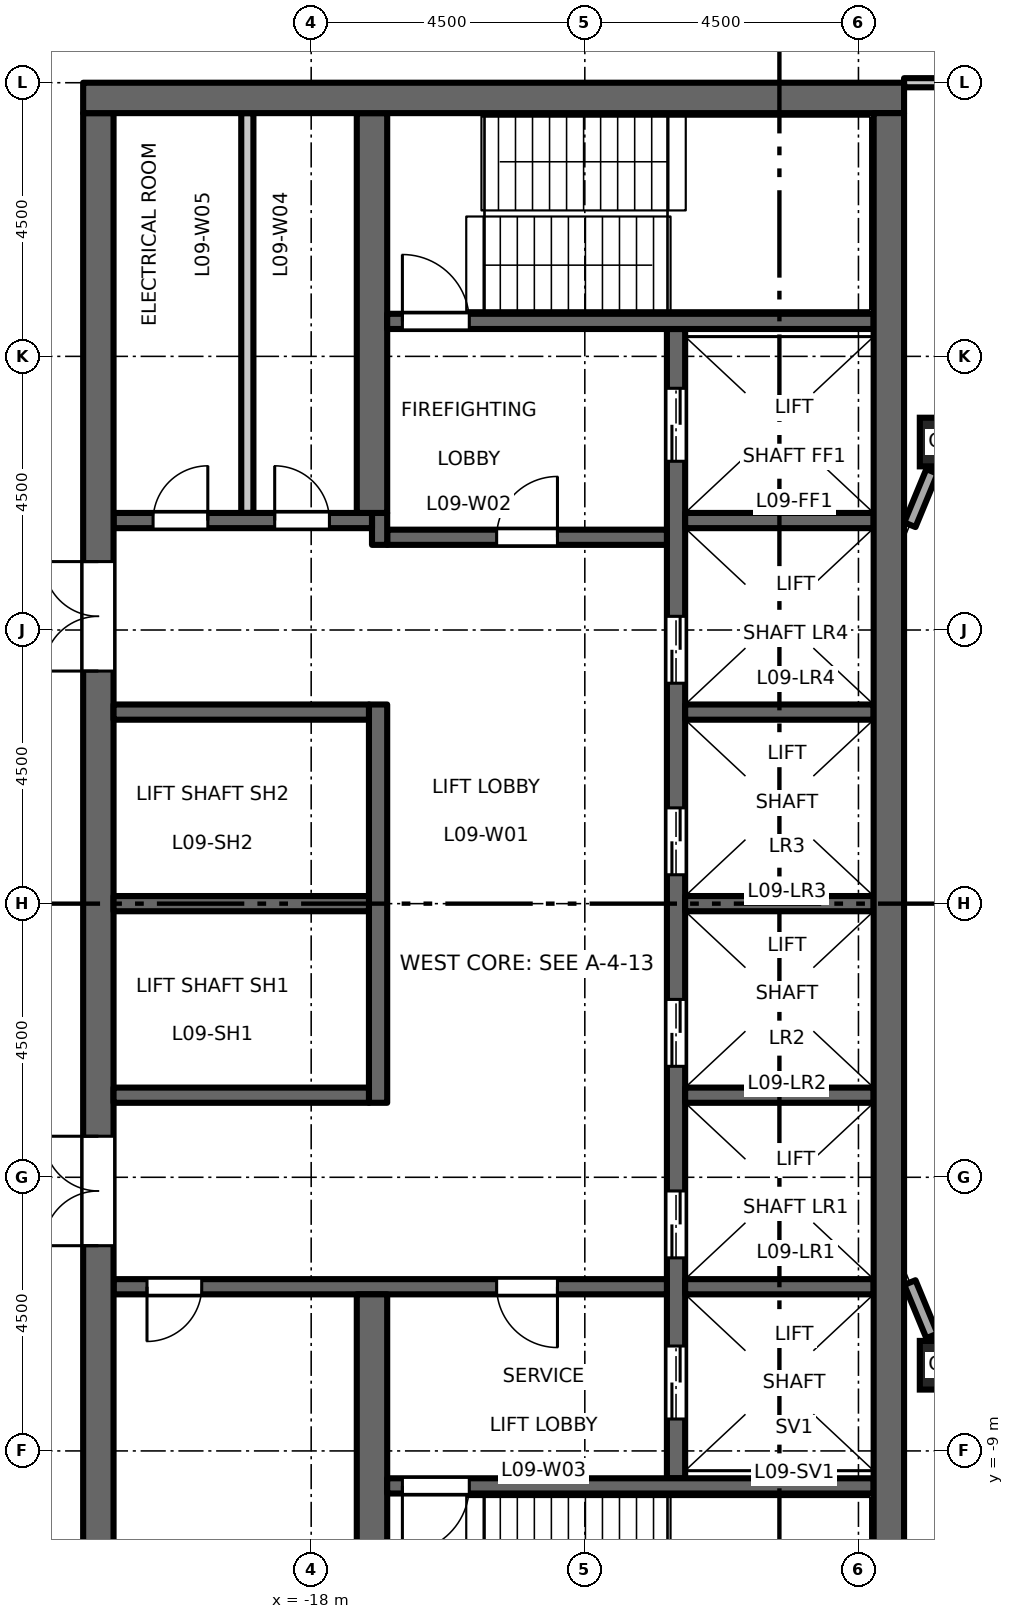
"""IFC4 building model, lengths in metres.
Left out: names, types, materials, properties, quantities, classifications, styles, units other than length and angle.
Written with IfcOpenShell. Run it as: python <this file> out.ifc"""

import sys

from ifc_helpers import new_model, si_unit, direction, frame, frame_2d, origin, origin_2d, place, context, subcontext, project, spatial, rectangle, hollow_rectangle, extrude, element, fill, save


model = new_model("IFC4")
c1 = context("Model", 3, precision=1e-05, world=origin(), true_north=direction((0.0, 1.0)))
c2 = subcontext(c1, "Body", "Model", "MODEL_VIEW")
j1 = project(units=[si_unit("LENGTHUNIT", "METRE"), si_unit("PLANEANGLEUNIT", "RADIAN")], contexts=[c1])
p1 = place(None, origin())
s1 = spatial("IfcSite", under=j1, at=p1, CompositionType="ELEMENT")
p2 = place(p1, origin())
s2 = spatial("IfcBuilding", under=s1, at=p2, CompositionType="ELEMENT")
p3 = place(p2, frame((0.0, 0.0, 44.7)))
s3 = spatial("IfcBuildingStorey", under=s2, at=p3, CompositionType="ELEMENT", Elevation=44.7)
for number, where, z_axis, x_axis in (
    (1, (-7.591, -7.591, 0.0), (0.0, 0.0, 1.0), (1.0, 0.0, 0.0)),
    (2, (-7.591, 7.591, 0.0), (0.0, 0.0, 1.0), (1.0, 0.0, 0.0)),
):
    element("IfcColumn", number, at=place(p3, frame(where, z_axis=z_axis, x_axis=x_axis)), inside=s3, PredefinedType="COLUMN", context=c2, shape_type="SweptSolid", body=[
        extrude(hollow_rectangle(XDim=0.8, YDim=0.8, WallThickness=0.05, at=origin_2d()), origin(), (0.0, 0.0, 1.0), 4.5),
    ])
p4 = place(p3, frame((-12.0, -9.45, 0.0), z_axis=(0.0, 0.0, 1.0), x_axis=(0.0, 1.0, 0.0)))
e3 = element("IfcWall", 3, at=p4, inside=s3, PredefinedType="SHEAR", context=c2, shape_type="SweptSolid", body=[
    extrude(rectangle(XDim=18.9, YDim=0.3, at=frame_2d((9.45, 0.0))), origin(), (0.0, 0.0, 1.0), 4.35),
])
p5 = place(p4, frame((3.625, 0.0, 0.0)))
e4 = element("IfcOpeningElement", 4, at=p5, cuts=e3, PredefinedType="OPENING", context=c2, shape_type="SweptSolid", body=[
    extrude(rectangle(XDim=1.1, YDim=2.1, at=frame_2d((0.55, 1.05))), frame((0.0, 0.16, 0.0), z_axis=(0.0, -1.0, 0.0), x_axis=(1.0, 0.0, 0.0)), (0.0, 0.0, 1.0), 0.32),
])
p6 = place(p4, frame((6.775, 0.0, 0.0)))
e5 = element("IfcOpeningElement", 5, at=p6, cuts=e3, PredefinedType="OPENING", context=c2, shape_type="SweptSolid", body=[
    extrude(rectangle(XDim=1.1, YDim=2.1, at=frame_2d((0.55, 1.05))), frame((0.0, 0.16, 0.0), z_axis=(0.0, -1.0, 0.0), x_axis=(1.0, 0.0, 0.0)), (0.0, 0.0, 1.0), 0.32),
])
p7 = place(p4, frame((9.925, 0.0, 0.0)))
e6 = element("IfcOpeningElement", 6, at=p7, cuts=e3, PredefinedType="OPENING", context=c2, shape_type="SweptSolid", body=[
    extrude(rectangle(XDim=1.1, YDim=2.1, at=frame_2d((0.55, 1.05))), frame((0.0, 0.16, 0.0), z_axis=(0.0, -1.0, 0.0), x_axis=(1.0, 0.0, 0.0)), (0.0, 0.0, 1.0), 0.32),
])
p8 = place(p4, frame((13.075, 0.0, 0.0)))
e7 = element("IfcOpeningElement", 7, at=p8, cuts=e3, PredefinedType="OPENING", context=c2, shape_type="SweptSolid", body=[
    extrude(rectangle(XDim=1.1, YDim=2.1, at=frame_2d((0.55, 1.05))), frame((0.0, 0.16, 0.0), z_axis=(0.0, -1.0, 0.0), x_axis=(1.0, 0.0, 0.0)), (0.0, 0.0, 1.0), 0.32),
])
p9 = place(p4, frame((16.725, 0.0, 0.0)))
e8 = element("IfcOpeningElement", 8, at=p9, cuts=e3, PredefinedType="OPENING", context=c2, shape_type="SweptSolid", body=[
    extrude(rectangle(XDim=1.2, YDim=2.1, at=frame_2d((0.6, 1.05))), frame((0.0, 0.16, 0.0), z_axis=(0.0, -1.0, 0.0), x_axis=(1.0, 0.0, 0.0)), (0.0, 0.0, 1.0), 0.32),
])
p10 = place(p4, frame((0.975, 0.0, 0.0)))
e9 = element("IfcOpeningElement", 9, at=p10, cuts=e3, PredefinedType="OPENING", context=c2, shape_type="SweptSolid", body=[
    extrude(rectangle(XDim=1.2, YDim=2.1, at=frame_2d((0.6, 1.05))), frame((0.0, 0.16, 0.0), z_axis=(0.0, -1.0, 0.0), x_axis=(1.0, 0.0, 0.0)), (0.0, 0.0, 1.0), 0.32),
])
p11 = place(p3, frame((-12.15, 6.025, 0.0), z_axis=(0.0, 0.0, 1.0), x_axis=(-1.0, 0.0, 0.0)))
e10 = element("IfcWall", 10, at=p11, inside=s3, PredefinedType="SHEAR", context=c2, shape_type="SweptSolid", body=[
    extrude(rectangle(XDim=4.6, YDim=0.25, at=frame_2d((2.3, 0.0))), origin(), (0.0, 0.0, 1.0), 4.35),
])
p12 = place(p11, frame((1.8, 0.0, 0.0)))
e11 = element("IfcOpeningElement", 11, at=p12, cuts=e10, PredefinedType="OPENING", context=c2, shape_type="SweptSolid", body=[
    extrude(rectangle(XDim=1.0, YDim=2.1, at=frame_2d((0.5, 1.05))), frame((0.0, 0.135, 0.0), z_axis=(0.0, -1.0, 0.0), x_axis=(1.0, 0.0, 0.0)), (0.0, 0.0, 1.0), 0.27),
])
p13 = place(p3, frame((-16.875, 5.9, 0.0), z_axis=(0.0, 0.0, 1.0), x_axis=(0.0, 1.0, 0.0)))
e12 = element("IfcWall", 12, at=p13, inside=s3, PredefinedType="SHEAR", context=c2, shape_type="SweptSolid", body=[
    extrude(rectangle(XDim=0.525, YDim=0.25, at=frame_2d((0.263, 0.0))), origin(), (0.0, 0.0, 1.0), 4.35),
])
p14 = place(p3, frame((-17.0, 6.3, 0.0), z_axis=(0.0, 0.0, 1.0), x_axis=(-1.0, 0.0, 0.0)))
e13 = element("IfcWall", 13, at=p14, inside=s3, PredefinedType="SHEAR", context=c2, shape_type="SweptSolid", body=[
    extrude(rectangle(XDim=4.25, YDim=0.25, at=frame_2d((2.125, 0.0))), origin(), (0.0, 0.0, 1.0), 4.35),
])
p15 = place(p14, frame((0.7, 0.0, 0.0)))
e14 = element("IfcOpeningElement", 14, at=p15, cuts=e13, PredefinedType="OPENING", context=c2, shape_type="SweptSolid", body=[
    extrude(rectangle(XDim=0.9, YDim=2.1, at=frame_2d((0.45, 1.05))), frame((0.0, 0.135, 0.0), z_axis=(0.0, -1.0, 0.0), x_axis=(1.0, 0.0, 0.0)), (0.0, 0.0, 1.0), 0.27),
])
p16 = place(p14, frame((2.7, 0.0, 0.0)))
e15 = element("IfcOpeningElement", 15, at=p16, cuts=e13, PredefinedType="OPENING", context=c2, shape_type="SweptSolid", body=[
    extrude(rectangle(XDim=0.9, YDim=2.1, at=frame_2d((0.45, 1.05))), frame((0.0, 0.135, 0.0), z_axis=(0.0, -1.0, 0.0), x_axis=(1.0, 0.0, 0.0)), (0.0, 0.0, 1.0), 0.27),
])
p17 = place(p3, frame((-12.15, -6.3, 0.0), z_axis=(0.0, 0.0, 1.0), x_axis=(-1.0, 0.0, 0.0)))
e16 = element("IfcWall", 16, at=p17, inside=s3, PredefinedType="SHEAR", context=c2, shape_type="SweptSolid", body=[
    extrude(rectangle(XDim=9.1, YDim=0.25, at=frame_2d((4.55, 0.0))), origin(), (0.0, 0.0, 1.0), 4.35),
])
p18 = place(p17, frame((1.8, 0.0, 0.0)))
e17 = element("IfcOpeningElement", 17, at=p18, cuts=e16, PredefinedType="OPENING", context=c2, shape_type="SweptSolid", body=[
    extrude(rectangle(XDim=1.0, YDim=2.1, at=frame_2d((0.5, 1.05))), frame((0.0, 0.135, 0.0), z_axis=(0.0, -1.0, 0.0), x_axis=(1.0, 0.0, 0.0)), (0.0, 0.0, 1.0), 0.27),
])
p19 = place(p17, frame((7.65, 0.0, 0.0)))
e18 = element("IfcOpeningElement", 18, at=p19, cuts=e16, PredefinedType="OPENING", context=c2, shape_type="SweptSolid", body=[
    extrude(rectangle(XDim=0.9, YDim=2.1, at=frame_2d((0.45, 1.05))), frame((0.0, 0.135, 0.0), z_axis=(0.0, -1.0, 0.0), x_axis=(1.0, 0.0, 0.0)), (0.0, 0.0, 1.0), 0.27),
])
p20 = place(p3, frame((-21.5, -13.0, 0.0), z_axis=(0.0, 0.0, 1.0), x_axis=(0.0, 1.0, 0.0)))
e19 = element("IfcWall", 19, at=p20, inside=s3, PredefinedType="SHEAR", context=c2, shape_type="SweptSolid", body=[
    extrude(rectangle(XDim=26.0, YDim=0.5, at=frame_2d((13.0, 0.0))), origin(), (0.0, 0.0, 1.0), 4.35),
])
p21 = place(p20, frame((16.825, 0.0, 0.0)))
e20 = element("IfcOpeningElement", 20, at=p21, cuts=e19, PredefinedType="OPENING", context=c2, shape_type="SweptSolid", body=[
    extrude(rectangle(XDim=1.8, YDim=2.1, at=frame_2d((0.9, 1.05))), frame((0.0, 0.26, 0.0), z_axis=(0.0, -1.0, 0.0), x_axis=(1.0, 0.0, 0.0)), (0.0, 0.0, 1.0), 0.52),
])
p22 = place(p20, frame((7.375, 0.0, 0.0)))
e21 = element("IfcOpeningElement", 21, at=p22, cuts=e19, PredefinedType="OPENING", context=c2, shape_type="SweptSolid", body=[
    extrude(rectangle(XDim=1.8, YDim=2.1, at=frame_2d((0.9, 1.05))), frame((0.0, 0.26, 0.0), z_axis=(0.0, -1.0, 0.0), x_axis=(1.0, 0.0, 0.0)), (0.0, 0.0, 1.0), 0.52),
])
p23 = place(p3, frame((-19.05, 6.425, 0.0), z_axis=(0.0, 0.0, 1.0), x_axis=(0.0, 1.0, 0.0)))
e22 = element("IfcWall", 22, at=p23, inside=s3, PredefinedType="PARTITIONING", context=c2, shape_type="SweptSolid", body=[
    extrude(rectangle(XDim=6.575, YDim=0.2, at=frame_2d((3.288, 0.0))), origin(), (0.0, 0.0, 1.0), 4.35),
])
p24 = place(p3, frame((-16.9, -3.275, 0.0), z_axis=(0.0, 0.0, 1.0), x_axis=(0.0, 1.0, 0.0)))
e23 = element("IfcWall", 23, at=p24, inside=s3, PredefinedType="SHEAR", context=c2, shape_type="SweptSolid", body=[
    extrude(rectangle(XDim=6.55, YDim=0.3, at=frame_2d((3.275, 0.0))), origin(), (0.0, 0.0, 1.0), 4.35),
])
for number, where, z_axis, x_axis in (
    (24, (-17.05, 0.0, 0.0), (0.0, 0.0, 1.0), (-1.0, 0.0, 0.0)),
    (25, (-17.05, 3.15, 0.0), (0.0, 0.0, 1.0), (-1.0, 0.0, 0.0)),
    (26, (-17.05, -3.15, 0.0), (0.0, 0.0, 1.0), (-1.0, 0.0, 0.0)),
):
    element("IfcWall", number, at=place(p3, frame(where, z_axis=z_axis, x_axis=x_axis)), inside=s3, PredefinedType="SHEAR", context=c2, shape_type="SweptSolid", body=[
        extrude(rectangle(XDim=4.2, YDim=0.25, at=frame_2d((2.1, 0.0))), origin(), (0.0, 0.0, 1.0), 4.35),
    ])
for number, where, z_axis, x_axis in (
    (27, (-17.0, 6.425, 0.0), (0.0, 0.0, 1.0), (0.0, 1.0, 0.0)),
    (28, (-17.0, -13.0, 0.0), (0.0, 0.0, 1.0), (0.0, 1.0, 0.0)),
):
    element("IfcWall", number, at=place(p3, frame(where, z_axis=z_axis, x_axis=x_axis)), inside=s3, PredefinedType="SHEAR", context=c2, shape_type="SweptSolid", body=[
        extrude(rectangle(XDim=6.575, YDim=0.5, at=frame_2d((3.288, 0.0))), origin(), (0.0, 0.0, 1.0), 4.35),
    ])
for number, where, z_axis, x_axis in (
    (29, (-8.75, 0.0, 0.0), (0.0, 0.0, 1.0), (-1.0, 0.0, 0.0)),
    (30, (-8.75, 3.15, 0.0), (0.0, 0.0, 1.0), (-1.0, 0.0, 0.0)),
    (31, (-8.75, 6.3, 0.0), (0.0, 0.0, 1.0), (-1.0, 0.0, 0.0)),
    (32, (-8.75, -3.15, 0.0), (0.0, 0.0, 1.0), (-1.0, 0.0, 0.0)),
    (33, (-8.75, -6.3, 0.0), (0.0, 0.0, 1.0), (-1.0, 0.0, 0.0)),
):
    element("IfcWall", number, at=place(p3, frame(where, z_axis=z_axis, x_axis=x_axis)), inside=s3, PredefinedType="SHEAR", context=c2, shape_type="SweptSolid", body=[
        extrude(rectangle(XDim=3.1, YDim=0.25, at=frame_2d((1.55, 0.0))), origin(), (0.0, 0.0, 1.0), 4.35),
    ])
p25 = place(p3, frame((-8.75, 9.575, 0.0), z_axis=(0.0, 0.0, 1.0), x_axis=(-1.0, 0.0, 0.0)))
e34 = element("IfcWall", 34, at=p25, inside=s3, PredefinedType="SHEAR", context=c2, shape_type="SweptSolid", body=[
    extrude(rectangle(XDim=8.0, YDim=0.25, at=frame_2d((4.0, 0.0))), origin(), (0.0, 0.0, 1.0), 4.35),
])
p26 = place(p25, frame((6.65, 0.0, 0.0)))
e35 = element("IfcOpeningElement", 35, at=p26, cuts=e34, PredefinedType="OPENING", context=c2, shape_type="SweptSolid", body=[
    extrude(rectangle(XDim=1.1, YDim=2.1, at=frame_2d((0.55, 1.05))), frame((0.0, 0.135, 0.0), z_axis=(0.0, -1.0, 0.0), x_axis=(1.0, 0.0, 0.0)), (0.0, 0.0, 1.0), 0.27),
])
p27 = place(p3, frame((-8.75, -9.575, 0.0), z_axis=(0.0, 0.0, 1.0), x_axis=(-1.0, 0.0, 0.0)))
e36 = element("IfcWall", 36, at=p27, inside=s3, PredefinedType="SHEAR", context=c2, shape_type="SweptSolid", body=[
    extrude(rectangle(XDim=8.0, YDim=0.25, at=frame_2d((4.0, 0.0))), origin(), (0.0, 0.0, 1.0), 4.35),
])
p28 = place(p27, frame((6.65, 0.0, 0.0)))
e37 = element("IfcOpeningElement", 37, at=p28, cuts=e36, PredefinedType="OPENING", context=c2, shape_type="SweptSolid", body=[
    extrude(rectangle(XDim=1.1, YDim=2.1, at=frame_2d((0.55, 1.05))), frame((0.0, 0.135, 0.0), z_axis=(0.0, -1.0, 0.0), x_axis=(1.0, 0.0, 0.0)), (0.0, 0.0, 1.0), 0.27),
])
p29 = place(p3, frame((-8.25, 13.25, 0.0), z_axis=(0.0, 0.0, 1.0), x_axis=(-1.0, 0.0, 0.0)))
e38 = element("IfcWall", 38, at=p29, inside=s3, PredefinedType="SHEAR", context=c2, shape_type="SweptSolid", body=[
    extrude(rectangle(XDim=13.5, YDim=0.5, at=frame_2d((6.75, 0.0))), origin(), (0.0, 0.0, 1.0), 4.35),
])
p30 = place(p3, frame((-8.5, -13.0, 0.0), z_axis=(0.0, 0.0, 1.0), x_axis=(0.0, 1.0, 0.0)))
e39 = element("IfcWall", 39, at=p30, inside=s3, PredefinedType="SHEAR", context=c2, shape_type="SweptSolid", body=[
    extrude(rectangle(XDim=26.0, YDim=0.5, at=frame_2d((13.0, 0.0))), origin(), (0.0, 0.0, 1.0), 4.35),
])
for number, where, z_axis, x_axis in (
    (40, (-7.791, 7.108, 0.0), (0.0, 0.0, 1.0), (-0.383, -0.924, 0.0)),
    (41, (-8.154, -6.231, 0.0), (0.0, 0.0, 1.0), (0.383, -0.924, 0.0)),
):
    element("IfcWall", number, at=place(p3, frame(where, z_axis=z_axis, x_axis=x_axis)), inside=s3, PredefinedType="STANDARD", context=c2, shape_type="SweptSolid", body=[
        extrude(rectangle(XDim=0.949, YDim=0.2, at=frame_2d((0.475, 0.0))), origin(), (0.0, 0.0, 1.0), 3.73),
    ])
p31 = place(p3, frame((-8.25, 13.5, 0.0), z_axis=(0.0, 0.0, 1.0), x_axis=(1.0, 0.0, 0.0)))
e42 = element("IfcWall", 42, at=p31, inside=s3, PredefinedType="PARTITIONING", context=c2, shape_type="SweptSolid", body=[
    extrude(rectangle(XDim=16.5, YDim=0.15, at=frame_2d((8.25, 0.0))), origin(), (0.0, 0.0, 1.0), 3.85),
])
p32 = place(p31, frame((7.65, 0.0, 0.0)))
e43 = element("IfcOpeningElement", 43, at=p32, cuts=e42, PredefinedType="OPENING", context=c2, shape_type="SweptSolid", body=[
    extrude(rectangle(XDim=1.0, YDim=2.1, at=frame_2d((0.5, 1.05))), frame((0.0, 0.085, 0.0), z_axis=(0.0, -1.0, 0.0), x_axis=(1.0, 0.0, 0.0)), (0.0, 0.0, 1.0), 0.17),
])
p33 = place(p12, origin())
e44 = element("IfcDoor", 44, at=p33, inside=s3, OperationType="SINGLE_SWING_LEFT", PredefinedType="DOOR", context=c2, shape_type="SweptSolid", body=[
    extrude(rectangle(XDim=1.0, YDim=2.1, at=frame_2d((0.5, 1.05))), frame((0.0, 0.025, 0.0), z_axis=(0.0, -1.0, 0.0), x_axis=(1.0, 0.0, 0.0)), (0.0, 0.0, 1.0), 0.05),
])
fill(e11, e44)
p34 = place(p18, origin())
e45 = element("IfcDoor", 45, at=p34, inside=s3, OperationType="SINGLE_SWING_RIGHT", PredefinedType="DOOR", context=c2, shape_type="SweptSolid", body=[
    extrude(rectangle(XDim=1.0, YDim=2.1, at=frame_2d((0.5, 1.05))), frame((0.0, 0.025, 0.0), z_axis=(0.0, -1.0, 0.0), x_axis=(1.0, 0.0, 0.0)), (0.0, 0.0, 1.0), 0.05),
])
fill(e17, e45)
p35 = place(p26, origin())
e46 = element("IfcDoor", 46, at=p35, inside=s3, OperationType="SINGLE_SWING_RIGHT", PredefinedType="DOOR", context=c2, shape_type="SweptSolid", body=[
    extrude(rectangle(XDim=1.1, YDim=2.1, at=frame_2d((0.55, 1.05))), frame((0.0, 0.025, 0.0), z_axis=(0.0, -1.0, 0.0), x_axis=(1.0, 0.0, 0.0)), (0.0, 0.0, 1.0), 0.05),
])
fill(e35, e46)
p36 = place(p28, origin())
e47 = element("IfcDoor", 47, at=p36, inside=s3, OperationType="SINGLE_SWING_LEFT", PredefinedType="DOOR", context=c2, shape_type="SweptSolid", body=[
    extrude(rectangle(XDim=1.1, YDim=2.1, at=frame_2d((0.55, 1.05))), frame((0.0, 0.025, 0.0), z_axis=(0.0, -1.0, 0.0), x_axis=(1.0, 0.0, 0.0)), (0.0, 0.0, 1.0), 0.05),
])
fill(e37, e47)
p37 = place(p21, origin())
e48 = element("IfcDoor", 48, at=p37, inside=s3, OperationType="DOUBLE_DOOR_DOUBLE_SWING", PredefinedType="DOOR", context=c2, shape_type="SweptSolid", body=[
    extrude(rectangle(XDim=1.8, YDim=2.1, at=frame_2d((0.9, 1.05))), frame((0.0, 0.025, 0.0), z_axis=(0.0, -1.0, 0.0), x_axis=(1.0, 0.0, 0.0)), (0.0, 0.0, 1.0), 0.05),
])
fill(e20, e48)
p38 = place(p22, origin())
e49 = element("IfcDoor", 49, at=p38, inside=s3, OperationType="DOUBLE_DOOR_DOUBLE_SWING", PredefinedType="DOOR", context=c2, shape_type="SweptSolid", body=[
    extrude(rectangle(XDim=1.8, YDim=2.1, at=frame_2d((0.9, 1.05))), frame((0.0, 0.025, 0.0), z_axis=(0.0, -1.0, 0.0), x_axis=(1.0, 0.0, 0.0)), (0.0, 0.0, 1.0), 0.05),
])
fill(e21, e49)
p39 = place(p5, origin())
e50 = element("IfcDoor", 50, at=p39, inside=s3, OperationType="DOUBLE_DOOR_SLIDING", PredefinedType="DOOR", context=c2, shape_type="SweptSolid", body=[
    extrude(rectangle(XDim=1.1, YDim=2.1, at=frame_2d((0.55, 1.05))), frame((0.0, 0.025, 0.0), z_axis=(0.0, -1.0, 0.0), x_axis=(1.0, 0.0, 0.0)), (0.0, 0.0, 1.0), 0.05),
])
fill(e4, e50)
p40 = place(p6, origin())
e51 = element("IfcDoor", 51, at=p40, inside=s3, OperationType="DOUBLE_DOOR_SLIDING", PredefinedType="DOOR", context=c2, shape_type="SweptSolid", body=[
    extrude(rectangle(XDim=1.1, YDim=2.1, at=frame_2d((0.55, 1.05))), frame((0.0, 0.025, 0.0), z_axis=(0.0, -1.0, 0.0), x_axis=(1.0, 0.0, 0.0)), (0.0, 0.0, 1.0), 0.05),
])
fill(e5, e51)
p41 = place(p7, origin())
e52 = element("IfcDoor", 52, at=p41, inside=s3, OperationType="DOUBLE_DOOR_SLIDING", PredefinedType="DOOR", context=c2, shape_type="SweptSolid", body=[
    extrude(rectangle(XDim=1.1, YDim=2.1, at=frame_2d((0.55, 1.05))), frame((0.0, 0.025, 0.0), z_axis=(0.0, -1.0, 0.0), x_axis=(1.0, 0.0, 0.0)), (0.0, 0.0, 1.0), 0.05),
])
fill(e6, e52)
p42 = place(p8, origin())
e53 = element("IfcDoor", 53, at=p42, inside=s3, OperationType="DOUBLE_DOOR_SLIDING", PredefinedType="DOOR", context=c2, shape_type="SweptSolid", body=[
    extrude(rectangle(XDim=1.1, YDim=2.1, at=frame_2d((0.55, 1.05))), frame((0.0, 0.025, 0.0), z_axis=(0.0, -1.0, 0.0), x_axis=(1.0, 0.0, 0.0)), (0.0, 0.0, 1.0), 0.05),
])
fill(e7, e53)
p43 = place(p9, origin())
e54 = element("IfcDoor", 54, at=p43, inside=s3, OperationType="DOUBLE_DOOR_SLIDING", PredefinedType="DOOR", context=c2, shape_type="SweptSolid", body=[
    extrude(rectangle(XDim=1.2, YDim=2.1, at=frame_2d((0.6, 1.05))), frame((0.0, 0.025, 0.0), z_axis=(0.0, -1.0, 0.0), x_axis=(1.0, 0.0, 0.0)), (0.0, 0.0, 1.0), 0.05),
])
fill(e8, e54)
p44 = place(p10, origin())
e55 = element("IfcDoor", 55, at=p44, inside=s3, OperationType="DOUBLE_DOOR_SLIDING", PredefinedType="DOOR", context=c2, shape_type="SweptSolid", body=[
    extrude(rectangle(XDim=1.2, YDim=2.1, at=frame_2d((0.6, 1.05))), frame((0.0, 0.025, 0.0), z_axis=(0.0, -1.0, 0.0), x_axis=(1.0, 0.0, 0.0)), (0.0, 0.0, 1.0), 0.05),
])
fill(e9, e55)
p45 = place(p15, origin())
e56 = element("IfcDoor", 56, at=p45, inside=s3, OperationType="SINGLE_SWING_RIGHT", PredefinedType="DOOR", context=c2, shape_type="SweptSolid", body=[
    extrude(rectangle(XDim=0.9, YDim=2.1, at=frame_2d((0.45, 1.05))), frame((0.0, 0.025, 0.0), z_axis=(0.0, -1.0, 0.0), x_axis=(1.0, 0.0, 0.0)), (0.0, 0.0, 1.0), 0.05),
])
fill(e14, e56)
p46 = place(p16, origin())
e57 = element("IfcDoor", 57, at=p46, inside=s3, OperationType="SINGLE_SWING_LEFT", PredefinedType="DOOR", context=c2, shape_type="SweptSolid", body=[
    extrude(rectangle(XDim=0.9, YDim=2.1, at=frame_2d((0.45, 1.05))), frame((0.0, 0.025, 0.0), z_axis=(0.0, -1.0, 0.0), x_axis=(1.0, 0.0, 0.0)), (0.0, 0.0, 1.0), 0.05),
])
fill(e15, e57)
p47 = place(p19, origin())
e58 = element("IfcDoor", 58, at=p47, inside=s3, OperationType="SINGLE_SWING_LEFT", PredefinedType="DOOR", context=c2, shape_type="SweptSolid", body=[
    extrude(rectangle(XDim=0.9, YDim=2.1, at=frame_2d((0.45, 1.05))), frame((0.0, 0.025, 0.0), z_axis=(0.0, -1.0, 0.0), x_axis=(1.0, 0.0, 0.0)), (0.0, 0.0, 1.0), 0.05),
])
fill(e18, e58)
save(model, sys.argv[1])
